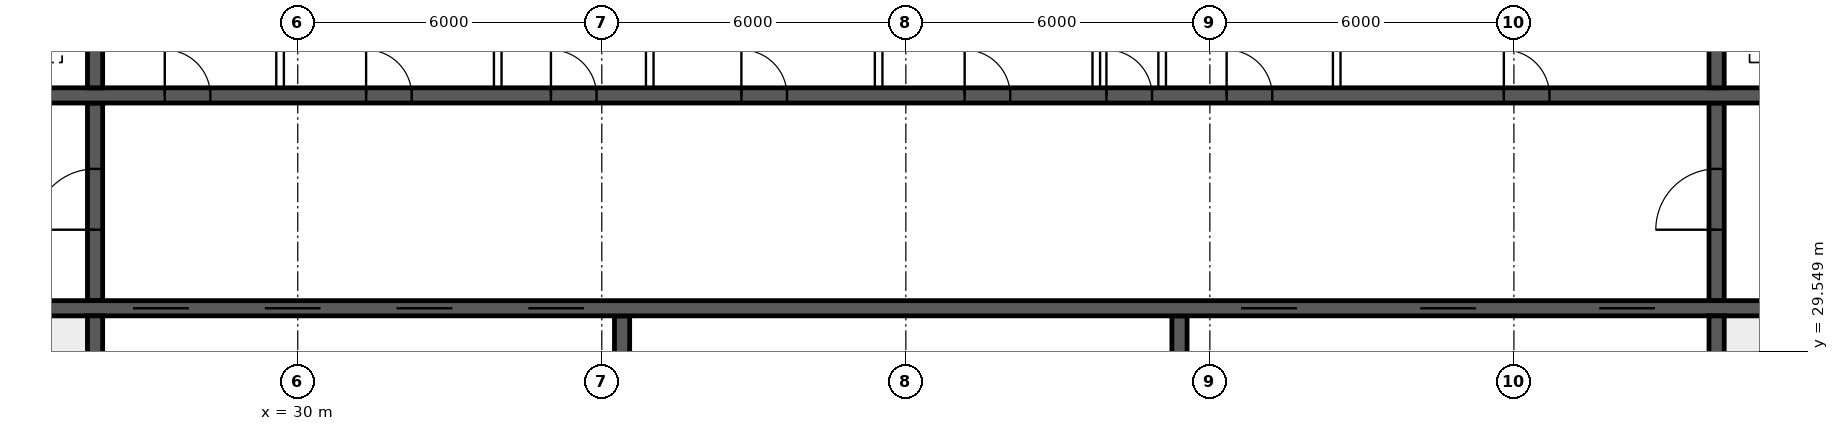
"""IFC4 building model, lengths in metres.
Left out: names, types, materials, properties, quantities, classifications, styles, units other than length and angle.
Written with IfcOpenShell. Run it as: python <this file> out.ifc"""

import sys

from ifc_helpers import new_model, si_unit, direction, frame, frame_2d, origin, place, context, subcontext, project, spatial, rectangle, extrude, element, fill, save


model = new_model("IFC4")
c1 = context("Model", 3, precision=1e-05, world=origin(), true_north=direction((0.0, 1.0)))
c2 = subcontext(c1, "Body", "Model", "MODEL_VIEW")
j1 = project(units=[si_unit("LENGTHUNIT", "METRE"), si_unit("PLANEANGLEUNIT", "RADIAN")], contexts=[c1])
p1 = place(None, origin())
s1 = spatial("IfcSite", under=j1, at=p1, CompositionType="ELEMENT")
p2 = place(p1, origin())
s2 = spatial("IfcBuilding", under=s1, at=p2, CompositionType="ELEMENT")
p3 = place(p2, frame((0.0, 0.0, 16.0)))
s3 = spatial("IfcBuildingStorey", under=s2, at=p3, CompositionType="ELEMENT", Elevation=16.0)
p4 = place(p3, frame((18.5, 30.4, 0.0), z_axis=(0.0, 0.0, 1.0), x_axis=(1.0, 0.0, 0.0)))
e1 = element("IfcWall", 1, at=p4, inside=s3, PredefinedType="SHEAR", context=c2, shape_type="SweptSolid", body=[
    extrude(rectangle(XDim=47.0, YDim=0.3, at=frame_2d((23.5, 0.0))), origin(), (0.0, 0.0, 1.0), 4.2),
])
p5 = place(p4, frame((0.4, 0.0, 0.0)))
e2 = element("IfcOpeningElement", 2, at=p5, cuts=e1, PredefinedType="OPENING", context=c2, shape_type="SweptSolid", body=[
    extrude(rectangle(XDim=1.0, YDim=2.1, at=frame_2d((0.5, 1.05))), frame((0.0, 0.16, 0.0), z_axis=(0.0, -1.0, 0.0), x_axis=(1.0, 0.0, 0.0)), (0.0, 0.0, 1.0), 0.32),
])
p6 = place(p4, frame((45.6, 0.0, 0.0)))
e3 = element("IfcOpeningElement", 3, at=p6, cuts=e1, PredefinedType="OPENING", context=c2, shape_type="SweptSolid", body=[
    extrude(rectangle(XDim=1.0, YDim=2.1, at=frame_2d((0.5, 1.05))), frame((0.0, 0.16, 0.0), z_axis=(0.0, -1.0, 0.0), x_axis=(1.0, 0.0, 0.0)), (0.0, 0.0, 1.0), 0.32),
])
p7 = place(p4, frame((8.25, 0.0, 0.0)))
e4 = element("IfcOpeningElement", 4, at=p7, cuts=e1, PredefinedType="OPENING", context=c2, shape_type="SweptSolid", body=[
    extrude(rectangle(XDim=1.1, YDim=2.1, at=frame_2d((0.55, 1.05))), frame((0.0, 0.16, 0.0), z_axis=(0.0, -1.0, 0.0), x_axis=(1.0, 0.0, 0.0)), (0.0, 0.0, 1.0), 0.32),
])
p8 = place(p4, frame((10.85, 0.0, 0.0)))
e5 = element("IfcOpeningElement", 5, at=p8, cuts=e1, PredefinedType="OPENING", context=c2, shape_type="SweptSolid", body=[
    extrude(rectangle(XDim=1.1, YDim=2.1, at=frame_2d((0.55, 1.05))), frame((0.0, 0.16, 0.0), z_axis=(0.0, -1.0, 0.0), x_axis=(1.0, 0.0, 0.0)), (0.0, 0.0, 1.0), 0.32),
])
p9 = place(p4, frame((13.45, 0.0, 0.0)))
e6 = element("IfcOpeningElement", 6, at=p9, cuts=e1, PredefinedType="OPENING", context=c2, shape_type="SweptSolid", body=[
    extrude(rectangle(XDim=1.1, YDim=2.1, at=frame_2d((0.55, 1.05))), frame((0.0, 0.16, 0.0), z_axis=(0.0, -1.0, 0.0), x_axis=(1.0, 0.0, 0.0)), (0.0, 0.0, 1.0), 0.32),
])
p10 = place(p4, frame((16.05, 0.0, 0.0)))
e7 = element("IfcOpeningElement", 7, at=p10, cuts=e1, PredefinedType="OPENING", context=c2, shape_type="SweptSolid", body=[
    extrude(rectangle(XDim=1.1, YDim=2.1, at=frame_2d((0.55, 1.05))), frame((0.0, 0.16, 0.0), z_axis=(0.0, -1.0, 0.0), x_axis=(1.0, 0.0, 0.0)), (0.0, 0.0, 1.0), 0.32),
])
p11 = place(p4, frame((30.117, 0.0, 0.0)))
e8 = element("IfcOpeningElement", 8, at=p11, cuts=e1, PredefinedType="OPENING", context=c2, shape_type="SweptSolid", body=[
    extrude(rectangle(XDim=1.1, YDim=2.1, at=frame_2d((0.55, 1.05))), frame((0.0, 0.16, 0.0), z_axis=(0.0, -1.0, 0.0), x_axis=(1.0, 0.0, 0.0)), (0.0, 0.0, 1.0), 0.32),
])
p12 = place(p4, frame((33.65, 0.0, 0.0)))
e9 = element("IfcOpeningElement", 9, at=p12, cuts=e1, PredefinedType="OPENING", context=c2, shape_type="SweptSolid", body=[
    extrude(rectangle(XDim=1.1, YDim=2.1, at=frame_2d((0.55, 1.05))), frame((0.0, 0.16, 0.0), z_axis=(0.0, -1.0, 0.0), x_axis=(1.0, 0.0, 0.0)), (0.0, 0.0, 1.0), 0.32),
])
p13 = place(p4, frame((37.183, 0.0, 0.0)))
e10 = element("IfcOpeningElement", 10, at=p13, cuts=e1, PredefinedType="OPENING", context=c2, shape_type="SweptSolid", body=[
    extrude(rectangle(XDim=1.1, YDim=2.1, at=frame_2d((0.55, 1.05))), frame((0.0, 0.16, 0.0), z_axis=(0.0, -1.0, 0.0), x_axis=(1.0, 0.0, 0.0)), (0.0, 0.0, 1.0), 0.32),
])
p14 = place(p3, frame((18.5, 34.6, 0.0), z_axis=(0.0, 0.0, 1.0), x_axis=(1.0, 0.0, 0.0)))
e11 = element("IfcWall", 11, at=p14, inside=s3, PredefinedType="SHEAR", context=c2, shape_type="SweptSolid", body=[
    extrude(rectangle(XDim=47.0, YDim=0.3, at=frame_2d((23.5, 0.0))), origin(), (0.0, 0.0, 1.0), 4.2),
])
p15 = place(p14, frame((0.9, 0.0, 0.0)))
e12 = element("IfcOpeningElement", 12, at=p15, cuts=e11, PredefinedType="OPENING", context=c2, shape_type="SweptSolid", body=[
    extrude(rectangle(XDim=1.1, YDim=2.1, at=frame_2d((0.55, 1.05))), frame((0.0, 0.16, 0.0), z_axis=(0.0, -1.0, 0.0), x_axis=(1.0, 0.0, 0.0)), (0.0, 0.0, 1.0), 0.32),
])
p16 = place(p14, frame((45.0, 0.0, 0.0)))
e13 = element("IfcOpeningElement", 13, at=p16, cuts=e11, PredefinedType="OPENING", context=c2, shape_type="SweptSolid", body=[
    extrude(rectangle(XDim=1.1, YDim=2.1, at=frame_2d((0.55, 1.05))), frame((0.0, 0.16, 0.0), z_axis=(0.0, -1.0, 0.0), x_axis=(1.0, 0.0, 0.0)), (0.0, 0.0, 1.0), 0.32),
])
p17 = place(p14, frame((4.1, 0.0, 0.0)))
e14 = element("IfcOpeningElement", 14, at=p17, cuts=e11, PredefinedType="OPENING", context=c2, shape_type="SweptSolid", body=[
    extrude(rectangle(XDim=0.9, YDim=2.1, at=frame_2d((0.45, 1.05))), frame((0.0, 0.16, 0.0), z_axis=(0.0, -1.0, 0.0), x_axis=(1.0, 0.0, 0.0)), (0.0, 0.0, 1.0), 0.32),
])
p18 = place(p14, frame((42.0, 0.0, 0.0)))
e15 = element("IfcOpeningElement", 15, at=p18, cuts=e11, PredefinedType="OPENING", context=c2, shape_type="SweptSolid", body=[
    extrude(rectangle(XDim=0.9, YDim=2.1, at=frame_2d((0.45, 1.05))), frame((0.0, 0.16, 0.0), z_axis=(0.0, -1.0, 0.0), x_axis=(1.0, 0.0, 0.0)), (0.0, 0.0, 1.0), 0.32),
])
p19 = place(p14, frame((8.875, 0.0, 0.0)))
e16 = element("IfcOpeningElement", 16, at=p19, cuts=e11, PredefinedType="OPENING", context=c2, shape_type="SweptSolid", body=[
    extrude(rectangle(XDim=0.9, YDim=2.1, at=frame_2d((0.45, 1.05))), frame((0.0, 0.16, 0.0), z_axis=(0.0, -1.0, 0.0), x_axis=(1.0, 0.0, 0.0)), (0.0, 0.0, 1.0), 0.32),
])
p20 = place(p14, frame((12.849, 0.0, 0.0)))
e17 = element("IfcOpeningElement", 17, at=p20, cuts=e11, PredefinedType="OPENING", context=c2, shape_type="SweptSolid", body=[
    extrude(rectangle(XDim=0.9, YDim=2.1, at=frame_2d((0.45, 1.05))), frame((0.0, 0.16, 0.0), z_axis=(0.0, -1.0, 0.0), x_axis=(1.0, 0.0, 0.0)), (0.0, 0.0, 1.0), 0.32),
])
p21 = place(p14, frame((16.496, 0.0, 0.0)))
e18 = element("IfcOpeningElement", 18, at=p21, cuts=e11, PredefinedType="OPENING", context=c2, shape_type="SweptSolid", body=[
    extrude(rectangle(XDim=0.9, YDim=2.1, at=frame_2d((0.45, 1.05))), frame((0.0, 0.16, 0.0), z_axis=(0.0, -1.0, 0.0), x_axis=(1.0, 0.0, 0.0)), (0.0, 0.0, 1.0), 0.32),
])
p22 = place(p14, frame((20.255, 0.0, 0.0)))
e19 = element("IfcOpeningElement", 19, at=p22, cuts=e11, PredefinedType="OPENING", context=c2, shape_type="SweptSolid", body=[
    extrude(rectangle(XDim=0.9, YDim=2.1, at=frame_2d((0.45, 1.05))), frame((0.0, 0.16, 0.0), z_axis=(0.0, -1.0, 0.0), x_axis=(1.0, 0.0, 0.0)), (0.0, 0.0, 1.0), 0.32),
])
p23 = place(p14, frame((24.661, 0.0, 0.0)))
e20 = element("IfcOpeningElement", 20, at=p23, cuts=e11, PredefinedType="OPENING", context=c2, shape_type="SweptSolid", body=[
    extrude(rectangle(XDim=0.9, YDim=2.1, at=frame_2d((0.45, 1.05))), frame((0.0, 0.16, 0.0), z_axis=(0.0, -1.0, 0.0), x_axis=(1.0, 0.0, 0.0)), (0.0, 0.0, 1.0), 0.32),
])
p24 = place(p14, frame((27.458, 0.0, 0.0)))
e21 = element("IfcOpeningElement", 21, at=p24, cuts=e11, PredefinedType="OPENING", context=c2, shape_type="SweptSolid", body=[
    extrude(rectangle(XDim=0.9, YDim=2.1, at=frame_2d((0.45, 1.05))), frame((0.0, 0.16, 0.0), z_axis=(0.0, -1.0, 0.0), x_axis=(1.0, 0.0, 0.0)), (0.0, 0.0, 1.0), 0.32),
])
p25 = place(p14, frame((29.831, 0.0, 0.0)))
e22 = element("IfcOpeningElement", 22, at=p25, cuts=e11, PredefinedType="OPENING", context=c2, shape_type="SweptSolid", body=[
    extrude(rectangle(XDim=0.9, YDim=2.1, at=frame_2d((0.45, 1.05))), frame((0.0, 0.16, 0.0), z_axis=(0.0, -1.0, 0.0), x_axis=(1.0, 0.0, 0.0)), (0.0, 0.0, 1.0), 0.32),
])
p26 = place(p14, frame((35.302, 0.0, 0.0)))
e23 = element("IfcOpeningElement", 23, at=p26, cuts=e11, PredefinedType="OPENING", context=c2, shape_type="SweptSolid", body=[
    extrude(rectangle(XDim=0.9, YDim=2.1, at=frame_2d((0.45, 1.05))), frame((0.0, 0.16, 0.0), z_axis=(0.0, -1.0, 0.0), x_axis=(1.0, 0.0, 0.0)), (0.0, 0.0, 1.0), 0.32),
])
for number, where, z_axis, x_axis in (
    (24, (26.0, 26.3, 0.0), (0.0, 0.0, 1.0), (0.0, 1.0, 0.0)),
    (25, (58.0, 26.3, 0.0), (0.0, 0.0, 1.0), (0.0, 1.0, 0.0)),
):
    element("IfcWall", number, at=place(p3, frame(where, z_axis=z_axis, x_axis=x_axis)), inside=s3, PredefinedType="SHEAR", context=c2, shape_type="SweptSolid", body=[
        extrude(rectangle(XDim=3.95, YDim=0.3, at=frame_2d((1.975, 0.0))), origin(), (0.0, 0.0, 1.0), 4.2),
    ])
p27 = place(p3, frame((26.0, 30.55, 0.0), z_axis=(0.0, 0.0, 1.0), x_axis=(0.0, 1.0, 0.0)))
e26 = element("IfcWall", 26, at=p27, inside=s3, PredefinedType="SHEAR", context=c2, shape_type="SweptSolid", body=[
    extrude(rectangle(XDim=3.9, YDim=0.3, at=frame_2d((1.95, 0.0))), origin(), (0.0, 0.0, 1.0), 4.2),
])
p28 = place(p27, frame((1.4, 0.0, 0.0)))
e27 = element("IfcOpeningElement", 27, at=p28, cuts=e26, PredefinedType="OPENING", context=c2, shape_type="SweptSolid", body=[
    extrude(rectangle(XDim=1.2, YDim=2.1, at=frame_2d((0.6, 1.05))), frame((0.0, 0.16, 0.0), z_axis=(0.0, -1.0, 0.0), x_axis=(1.0, 0.0, 0.0)), (0.0, 0.0, 1.0), 0.32),
])
p29 = place(p3, frame((58.0, 30.55, 0.0), z_axis=(0.0, 0.0, 1.0), x_axis=(0.0, 1.0, 0.0)))
e28 = element("IfcWall", 28, at=p29, inside=s3, PredefinedType="SHEAR", context=c2, shape_type="SweptSolid", body=[
    extrude(rectangle(XDim=3.9, YDim=0.3, at=frame_2d((1.95, 0.0))), origin(), (0.0, 0.0, 1.0), 4.2),
])
p30 = place(p29, frame((1.4, 0.0, 0.0)))
e29 = element("IfcOpeningElement", 29, at=p30, cuts=e28, PredefinedType="OPENING", context=c2, shape_type="SweptSolid", body=[
    extrude(rectangle(XDim=1.2, YDim=2.1, at=frame_2d((0.6, 1.05))), frame((0.0, 0.16, 0.0), z_axis=(0.0, -1.0, 0.0), x_axis=(1.0, 0.0, 0.0)), (0.0, 0.0, 1.0), 0.32),
])
for number, where, z_axis, x_axis in (
    (30, (26.0, 34.75, 0.0), (0.0, 0.0, 1.0), (0.0, 1.0, 0.0)),
    (31, (58.0, 34.75, 0.0), (0.0, 0.0, 1.0), (0.0, 1.0, 0.0)),
):
    element("IfcWall", number, at=place(p3, frame(where, z_axis=z_axis, x_axis=x_axis)), inside=s3, PredefinedType="SHEAR", context=c2, shape_type="SweptSolid", body=[
        extrude(rectangle(XDim=2.95, YDim=0.3, at=frame_2d((1.475, 0.0))), origin(), (0.0, 0.0, 1.0), 4.2),
    ])
for number, where, z_axis, x_axis in (
    (32, (36.4, 26.3, 0.0), (0.0, 0.0, 1.0), (0.0, 1.0, 0.0)),
    (33, (47.4, 26.3, 0.0), (0.0, 0.0, 1.0), (0.0, 1.0, 0.0)),
):
    element("IfcWall", number, at=place(p3, frame(where, z_axis=z_axis, x_axis=x_axis)), inside=s3, PredefinedType="SHEAR", context=c2, shape_type="SweptSolid", body=[
        extrude(rectangle(XDim=3.95, YDim=0.3, at=frame_2d((1.975, 0.0))), origin(), (0.0, 0.0, 1.0), 4.2),
    ])
for number, where, z_axis, x_axis in (
    (34, (29.651, 34.75, 0.0), (0.0, 0.0, 1.0), (0.0, 1.0, 0.0)),
    (35, (33.946, 34.75, 0.0), (0.0, 0.0, 1.0), (0.0, 1.0, 0.0)),
    (36, (36.946, 34.75, 0.0), (0.0, 0.0, 1.0), (0.0, 1.0, 0.0)),
    (37, (41.463, 34.75, 0.0), (0.0, 0.0, 1.0), (0.0, 1.0, 0.0)),
    (38, (45.758, 34.75, 0.0), (0.0, 0.0, 1.0), (0.0, 1.0, 0.0)),
    (39, (47.058, 34.75, 0.0), (0.0, 0.0, 1.0), (0.0, 1.0, 0.0)),
    (40, (50.503, 34.75, 0.0), (0.0, 0.0, 1.0), (0.0, 1.0, 0.0)),
):
    element("IfcWall", number, at=place(p3, frame(where, z_axis=z_axis, x_axis=x_axis)), inside=s3, PredefinedType="SOLIDWALL", context=c2, shape_type="SweptSolid", body=[
        extrude(rectangle(XDim=2.95, YDim=0.15, at=frame_2d((1.475, 0.0))), origin(), (0.0, 0.0, 1.0), 3.95),
    ])
p31 = place(p28, origin())
e41 = element("IfcDoor", 41, at=p31, inside=s3, OperationType="SINGLE_SWING_LEFT", PredefinedType="DOOR", context=c2, shape_type="SweptSolid", body=[
    extrude(rectangle(XDim=1.2, YDim=2.1, at=frame_2d((0.6, 1.05))), frame((0.0, 0.025, 0.0), z_axis=(0.0, -1.0, 0.0), x_axis=(1.0, 0.0, 0.0)), (0.0, 0.0, 1.0), 0.05),
])
fill(e27, e41)
p32 = place(p30, origin())
e42 = element("IfcDoor", 42, at=p32, inside=s3, OperationType="SINGLE_SWING_LEFT", PredefinedType="DOOR", context=c2, shape_type="SweptSolid", body=[
    extrude(rectangle(XDim=1.2, YDim=2.1, at=frame_2d((0.6, 1.05))), frame((0.0, 0.025, 0.0), z_axis=(0.0, -1.0, 0.0), x_axis=(1.0, 0.0, 0.0)), (0.0, 0.0, 1.0), 0.05),
])
fill(e29, e42)
p33 = place(p19, origin())
e43 = element("IfcDoor", 43, at=p33, inside=s3, OperationType="SINGLE_SWING_LEFT", PredefinedType="DOOR", context=c2, shape_type="SweptSolid", body=[
    extrude(rectangle(XDim=0.9, YDim=2.1, at=frame_2d((0.45, 1.05))), frame((0.0, 0.025, 0.0), z_axis=(0.0, -1.0, 0.0), x_axis=(1.0, 0.0, 0.0)), (0.0, 0.0, 1.0), 0.05),
])
fill(e16, e43)
p34 = place(p20, origin())
e44 = element("IfcDoor", 44, at=p34, inside=s3, OperationType="SINGLE_SWING_LEFT", PredefinedType="DOOR", context=c2, shape_type="SweptSolid", body=[
    extrude(rectangle(XDim=0.9, YDim=2.1, at=frame_2d((0.45, 1.05))), frame((0.0, 0.025, 0.0), z_axis=(0.0, -1.0, 0.0), x_axis=(1.0, 0.0, 0.0)), (0.0, 0.0, 1.0), 0.05),
])
fill(e17, e44)
p35 = place(p21, origin())
e45 = element("IfcDoor", 45, at=p35, inside=s3, OperationType="SINGLE_SWING_LEFT", PredefinedType="DOOR", context=c2, shape_type="SweptSolid", body=[
    extrude(rectangle(XDim=0.9, YDim=2.1, at=frame_2d((0.45, 1.05))), frame((0.0, 0.025, 0.0), z_axis=(0.0, -1.0, 0.0), x_axis=(1.0, 0.0, 0.0)), (0.0, 0.0, 1.0), 0.05),
])
fill(e18, e45)
p36 = place(p22, origin())
e46 = element("IfcDoor", 46, at=p36, inside=s3, OperationType="SINGLE_SWING_LEFT", PredefinedType="DOOR", context=c2, shape_type="SweptSolid", body=[
    extrude(rectangle(XDim=0.9, YDim=2.1, at=frame_2d((0.45, 1.05))), frame((0.0, 0.025, 0.0), z_axis=(0.0, -1.0, 0.0), x_axis=(1.0, 0.0, 0.0)), (0.0, 0.0, 1.0), 0.05),
])
fill(e19, e46)
p37 = place(p23, origin())
e47 = element("IfcDoor", 47, at=p37, inside=s3, OperationType="SINGLE_SWING_LEFT", PredefinedType="DOOR", context=c2, shape_type="SweptSolid", body=[
    extrude(rectangle(XDim=0.9, YDim=2.1, at=frame_2d((0.45, 1.05))), frame((0.0, 0.025, 0.0), z_axis=(0.0, -1.0, 0.0), x_axis=(1.0, 0.0, 0.0)), (0.0, 0.0, 1.0), 0.05),
])
fill(e20, e47)
p38 = place(p24, origin())
e48 = element("IfcDoor", 48, at=p38, inside=s3, OperationType="SINGLE_SWING_LEFT", PredefinedType="DOOR", context=c2, shape_type="SweptSolid", body=[
    extrude(rectangle(XDim=0.9, YDim=2.1, at=frame_2d((0.45, 1.05))), frame((0.0, 0.025, 0.0), z_axis=(0.0, -1.0, 0.0), x_axis=(1.0, 0.0, 0.0)), (0.0, 0.0, 1.0), 0.05),
])
fill(e21, e48)
p39 = place(p25, origin())
e49 = element("IfcDoor", 49, at=p39, inside=s3, OperationType="SINGLE_SWING_LEFT", PredefinedType="DOOR", context=c2, shape_type="SweptSolid", body=[
    extrude(rectangle(XDim=0.9, YDim=2.1, at=frame_2d((0.45, 1.05))), frame((0.0, 0.025, 0.0), z_axis=(0.0, -1.0, 0.0), x_axis=(1.0, 0.0, 0.0)), (0.0, 0.0, 1.0), 0.05),
])
fill(e22, e49)
p40 = place(p26, origin())
e50 = element("IfcDoor", 50, at=p40, inside=s3, OperationType="SINGLE_SWING_LEFT", PredefinedType="DOOR", context=c2, shape_type="SweptSolid", body=[
    extrude(rectangle(XDim=0.9, YDim=2.1, at=frame_2d((0.45, 1.05))), frame((0.0, 0.025, 0.0), z_axis=(0.0, -1.0, 0.0), x_axis=(1.0, 0.0, 0.0)), (0.0, 0.0, 1.0), 0.05),
])
fill(e23, e50)
p41 = place(p7, origin())
e51 = element("IfcDoor", 51, at=p41, inside=s3, OperationType="DOUBLE_DOOR_SLIDING", PredefinedType="DOOR", context=c2, shape_type="SweptSolid", body=[
    extrude(rectangle(XDim=1.1, YDim=2.1, at=frame_2d((0.55, 1.05))), frame((0.0, 0.025, 0.0), z_axis=(0.0, -1.0, 0.0), x_axis=(1.0, 0.0, 0.0)), (0.0, 0.0, 1.0), 0.05),
])
fill(e4, e51)
p42 = place(p8, origin())
e52 = element("IfcDoor", 52, at=p42, inside=s3, OperationType="DOUBLE_DOOR_SLIDING", PredefinedType="DOOR", context=c2, shape_type="SweptSolid", body=[
    extrude(rectangle(XDim=1.1, YDim=2.1, at=frame_2d((0.55, 1.05))), frame((0.0, 0.025, 0.0), z_axis=(0.0, -1.0, 0.0), x_axis=(1.0, 0.0, 0.0)), (0.0, 0.0, 1.0), 0.05),
])
fill(e5, e52)
p43 = place(p9, origin())
e53 = element("IfcDoor", 53, at=p43, inside=s3, OperationType="DOUBLE_DOOR_SLIDING", PredefinedType="DOOR", context=c2, shape_type="SweptSolid", body=[
    extrude(rectangle(XDim=1.1, YDim=2.1, at=frame_2d((0.55, 1.05))), frame((0.0, 0.025, 0.0), z_axis=(0.0, -1.0, 0.0), x_axis=(1.0, 0.0, 0.0)), (0.0, 0.0, 1.0), 0.05),
])
fill(e6, e53)
p44 = place(p10, origin())
e54 = element("IfcDoor", 54, at=p44, inside=s3, OperationType="DOUBLE_DOOR_SLIDING", PredefinedType="DOOR", context=c2, shape_type="SweptSolid", body=[
    extrude(rectangle(XDim=1.1, YDim=2.1, at=frame_2d((0.55, 1.05))), frame((0.0, 0.025, 0.0), z_axis=(0.0, -1.0, 0.0), x_axis=(1.0, 0.0, 0.0)), (0.0, 0.0, 1.0), 0.05),
])
fill(e7, e54)
p45 = place(p11, origin())
e55 = element("IfcDoor", 55, at=p45, inside=s3, OperationType="DOUBLE_DOOR_SLIDING", PredefinedType="DOOR", context=c2, shape_type="SweptSolid", body=[
    extrude(rectangle(XDim=1.1, YDim=2.1, at=frame_2d((0.55, 1.05))), frame((0.0, 0.025, 0.0), z_axis=(0.0, -1.0, 0.0), x_axis=(1.0, 0.0, 0.0)), (0.0, 0.0, 1.0), 0.05),
])
fill(e8, e55)
p46 = place(p12, origin())
e56 = element("IfcDoor", 56, at=p46, inside=s3, OperationType="DOUBLE_DOOR_SLIDING", PredefinedType="DOOR", context=c2, shape_type="SweptSolid", body=[
    extrude(rectangle(XDim=1.1, YDim=2.1, at=frame_2d((0.55, 1.05))), frame((0.0, 0.025, 0.0), z_axis=(0.0, -1.0, 0.0), x_axis=(1.0, 0.0, 0.0)), (0.0, 0.0, 1.0), 0.05),
])
fill(e9, e56)
p47 = place(p13, origin())
e57 = element("IfcDoor", 57, at=p47, inside=s3, OperationType="DOUBLE_DOOR_SLIDING", PredefinedType="DOOR", context=c2, shape_type="SweptSolid", body=[
    extrude(rectangle(XDim=1.1, YDim=2.1, at=frame_2d((0.55, 1.05))), frame((0.0, 0.025, 0.0), z_axis=(0.0, -1.0, 0.0), x_axis=(1.0, 0.0, 0.0)), (0.0, 0.0, 1.0), 0.05),
])
fill(e10, e57)
save(model, sys.argv[1])
